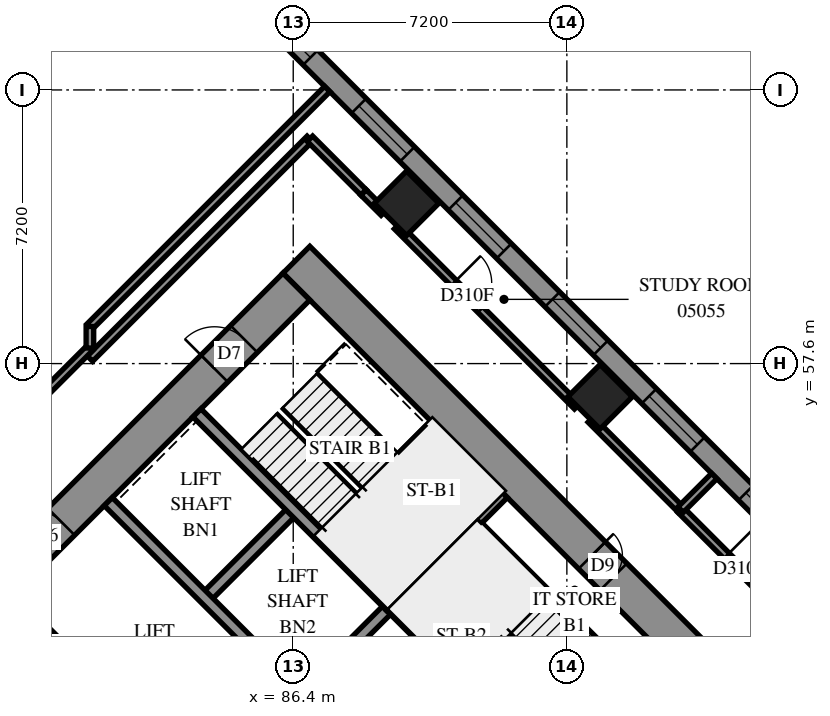
"""IFC4 building model, lengths in metres.
Left out: names, types, materials, properties, quantities, classifications, styles, units other than length and angle.
Written with IfcOpenShell. Run it as: python <this file> out.ifc"""

import sys

from ifc_helpers import new_model, si_unit, direction, frame, frame_2d, origin, origin_2d, place, context, subcontext, project, spatial, polyline, rectangle, outline, extrude, element, fill, save


model = new_model("IFC4")
c1 = context("Model", 3, precision=1e-05, world=origin(), true_north=direction((0.0, 1.0)))
c2 = subcontext(c1, "Body", "Model", "MODEL_VIEW")
j1 = project(units=[si_unit("LENGTHUNIT", "METRE"), si_unit("PLANEANGLEUNIT", "RADIAN")], contexts=[c1])
p1 = place(None, origin())
s1 = spatial("IfcSite", under=j1, at=p1, CompositionType="ELEMENT")
p2 = place(p1, origin())
s2 = spatial("IfcBuilding", under=s1, at=p2, CompositionType="ELEMENT")
p3 = place(p2, frame((0.0, 0.0, 22.8)))
s3 = spatial("IfcBuildingStorey", under=s2, at=p3, CompositionType="ELEMENT", Elevation=22.8)
for number, where, z_axis, x_axis in (
    (1, (89.382, 61.818, 0.0), (0.0, 0.0, 1.0), (0.707, -0.707, 0.0)),
    (2, (94.474, 56.727, 0.0), (0.0, 0.0, 1.0), (0.707, -0.707, 0.0)),
):
    element("IfcColumn", number, at=place(p3, frame(where, z_axis=z_axis, x_axis=x_axis)), inside=s3, PredefinedType="COLUMN", context=c2, shape_type="SweptSolid", body=[
        extrude(rectangle(XDim=1.2, YDim=1.2, at=origin_2d()), origin(), (0.0, 0.0, 1.0), 3.9),
    ])
p4 = place(p3, frame((86.483, 60.333, -0.4), z_axis=(0.0, 0.0, 1.0), x_axis=(0.70710983, -0.7071037324, 0.0)))
e3 = element("IfcWall", 3, at=p4, inside=s3, PredefinedType="SHEAR", context=c2, shape_type="SweptSolid", body=[
    extrude(rectangle(XDim=16.4, YDim=1.0, at=frame_2d((8.2, 0.0))), origin(), (0.0, 0.0, 1.0), 3.6),
])
p5 = place(p4, frame((11.0, 0.0, 0.4)))
e4 = element("IfcOpeningElement", 4, at=p5, cuts=e3, PredefinedType="OPENING", context=c2, shape_type="SweptSolid", body=[
    extrude(rectangle(XDim=0.8, YDim=2.1, at=frame_2d((0.4, 1.05))), frame((0.0, 0.51, 0.0), z_axis=(0.0, -1.0, 0.0), x_axis=(1.0, 0.0, 0.0)), (0.0, 0.0, 1.0), 1.02),
])
p6 = place(p3, frame((76.301, 49.443, -0.4), z_axis=(0.0, 0.0, 1.0), x_axis=(0.7071067812, 0.7071067812, 0.0)))
e5 = element("IfcWall", 5, at=p6, inside=s3, PredefinedType="SHEAR", context=c2, shape_type="SweptSolid", body=[
    extrude(rectangle(XDim=14.4, YDim=1.0, at=frame_2d((7.2, 0.0))), origin(), (0.0, 0.0, 1.0), 3.6),
])
p7 = place(p6, frame((4.55, 0.0, 0.4)))
e6 = element("IfcOpeningElement", 6, at=p7, cuts=e5, PredefinedType="OPENING", context=c2, shape_type="SweptSolid", body=[
    extrude(rectangle(XDim=1.1, YDim=2.1, at=frame_2d((0.55, 1.05))), frame((0.0, 0.51, 0.0), z_axis=(0.0, -1.0, 0.0), x_axis=(1.0, 0.0, 0.0)), (0.0, 0.0, 1.0), 1.02),
])
p8 = place(p6, frame((11.35, 0.0, 0.4)))
e7 = element("IfcOpeningElement", 7, at=p8, cuts=e5, PredefinedType="OPENING", context=c2, shape_type="SweptSolid", body=[
    extrude(rectangle(XDim=1.1, YDim=2.1, at=frame_2d((0.55, 1.05))), frame((0.0, 0.51, 0.0), z_axis=(0.0, -1.0, 0.0), x_axis=(1.0, 0.0, 0.0)), (0.0, 0.0, 1.0), 1.02),
])
p9 = place(p3, frame((84.079, 51.423, 0.0), z_axis=(0.0, 0.0, 1.0), x_axis=(0.7071219326, 0.7070916295, 0.0)))
e8 = element("IfcWall", 8, at=p9, inside=s3, PredefinedType="SOLIDWALL", context=c2, shape_type="SweptSolid", body=[
    extrude(rectangle(XDim=3.3, YDim=0.3, at=frame_2d((1.65, 0.0))), origin(), (0.0, 0.0, 1.0), 3.9),
])
p10 = place(p3, frame((86.625, 48.878, 0.0), z_axis=(0.0, 0.0, 1.0), x_axis=(0.7071067812, 0.7071067812, 0.0)))
e9 = element("IfcWall", 9, at=p10, inside=s3, PredefinedType="SOLIDWALL", context=c2, shape_type="SweptSolid", body=[
    extrude(rectangle(XDim=3.3, YDim=0.3, at=frame_2d((1.65, 0.0))), origin(), (0.0, 0.0, 1.0), 3.9),
])
p11 = place(p3, frame((78.988, 51.423, 0.0), z_axis=(0.0, 0.0, 1.0), x_axis=(0.7071067812, -0.7071067812, 0.0)))
e10 = element("IfcWall", 10, at=p11, inside=s3, PredefinedType="SOLIDWALL", context=c2, shape_type="SweptSolid", body=[
    extrude(rectangle(XDim=14.4, YDim=0.3, at=frame_2d((7.2, 0.0))), origin(), (0.0, 0.0, 1.0), 3.9),
])
p12 = place(p11, frame((1.25, 0.0, 0.0)))
e11 = element("IfcOpeningElement", 11, at=p12, cuts=e10, PredefinedType="OPENING", context=c2, shape_type="SweptSolid", body=[
    extrude(rectangle(XDim=1.1, YDim=2.1, at=frame_2d((0.55, 1.05))), frame((0.0, 0.16, 0.0), z_axis=(0.0, -1.0, 0.0), x_axis=(1.0, 0.0, 0.0)), (0.0, 0.0, 1.0), 0.32),
])
p13 = place(p11, frame((4.85, 0.0, 0.0)))
e12 = element("IfcOpeningElement", 12, at=p13, cuts=e10, PredefinedType="OPENING", context=c2, shape_type="SweptSolid", body=[
    extrude(rectangle(XDim=1.1, YDim=2.1, at=frame_2d((0.55, 1.05))), frame((0.0, 0.16, 0.0), z_axis=(0.0, -1.0, 0.0), x_axis=(1.0, 0.0, 0.0)), (0.0, 0.0, 1.0), 0.32),
])
p14 = place(p11, frame((8.45, 0.0, 0.0)))
e13 = element("IfcOpeningElement", 13, at=p14, cuts=e10, PredefinedType="OPENING", context=c2, shape_type="SweptSolid", body=[
    extrude(rectangle(XDim=1.1, YDim=2.1, at=frame_2d((0.55, 1.05))), frame((0.0, 0.16, 0.0), z_axis=(0.0, -1.0, 0.0), x_axis=(1.0, 0.0, 0.0)), (0.0, 0.0, 1.0), 0.32),
])
p15 = place(p11, frame((12.05, 0.0, 0.0)))
e14 = element("IfcOpeningElement", 14, at=p15, cuts=e10, PredefinedType="OPENING", context=c2, shape_type="SweptSolid", body=[
    extrude(rectangle(XDim=1.1, YDim=2.1, at=frame_2d((0.55, 1.05))), frame((0.0, 0.16, 0.0), z_axis=(0.0, -1.0, 0.0), x_axis=(1.0, 0.0, 0.0)), (0.0, 0.0, 1.0), 0.32),
])
p16 = place(p3, frame((81.534, 53.969, 0.0), z_axis=(0.0, 0.0, 1.0), x_axis=(0.707103309, -0.7071102534, 0.0)))
e15 = element("IfcWall", 15, at=p16, inside=s3, PredefinedType="SOLIDWALL", context=c2, shape_type="SweptSolid", body=[
    extrude(rectangle(XDim=14.4, YDim=0.3, at=frame_2d((7.2, 0.0))), origin(), (0.0, 0.0, 1.0), 3.9),
])
p17 = place(p16, frame((12.05, 0.0, 0.0)))
e16 = element("IfcOpeningElement", 16, at=p17, cuts=e15, PredefinedType="OPENING", context=c2, shape_type="SweptSolid", body=[
    extrude(rectangle(XDim=1.1, YDim=2.1, at=frame_2d((0.55, 1.05))), frame((0.0, 0.16, 0.0), z_axis=(0.0, -1.0, 0.0), x_axis=(1.0, 0.0, 0.0)), (0.0, 0.0, 1.0), 0.32),
])
for number, where, z_axis, x_axis in (
    (17, (83.867, 56.302, 0.0), (0.0, 0.0, 1.0), (0.707, -0.707, 0.0)),
    (18, (88.958, 51.211, 0.0), (0.0, 0.0, 1.0), (0.707, -0.707, 0.0)),
):
    element("IfcWall", number, at=place(p3, frame(where, z_axis=z_axis, x_axis=x_axis)), inside=s3, PredefinedType="SOLIDWALL", context=c2, shape_type="SweptSolid", body=[
        extrude(rectangle(XDim=7.2, YDim=0.3, at=frame_2d((3.6, 0.0))), origin(), (0.0, 0.0, 1.0), 3.9),
    ])
p18 = place(p3, frame((88.958, 51.211, 0.0), z_axis=(0.0, 0.0, 1.0), x_axis=(0.7071067812, 0.7071067812, 0.0)))
e19 = element("IfcWall", 19, at=p18, inside=s3, PredefinedType="SOLIDWALL", context=c2, shape_type="SweptSolid", body=[
    extrude(rectangle(XDim=4.2, YDim=0.3, at=frame_2d((2.1, 0.0))), origin(), (0.0, 0.0, 1.0), 3.9),
])
p19 = place(p3, frame((117.843, 34.665, 0.0), z_axis=(0.0, 0.0, 1.0), x_axis=(-0.7071067812, 0.7071067812, 0.0)))
e20 = element("IfcWall", 20, at=p19, inside=s3, PredefinedType="SOLIDWALL", context=c2, shape_type="SweptSolid", body=[
    extrude(outline(polyline([(-0.275, -0.275), (54.222, -0.275), (53.994, 0.275), (0.275, 0.275), (-0.275, -0.275)])), origin(), (0.0, 0.0, 1.0), 3.9),
])
p20 = place(p19, frame((0.8, 0.0, 0.7)))
e21 = element("IfcOpeningElement", 21, at=p20, cuts=e20, PredefinedType="OPENING", context=c2, shape_type="SweptSolid", body=[
    extrude(rectangle(XDim=1.8, YDim=2.4, at=frame_2d((0.9, 1.2))), frame((0.0, 0.285, 0.0), z_axis=(0.0, -1.0, 0.0), x_axis=(1.0, 0.0, 0.0)), (0.0, 0.0, 1.0), 0.57),
])
p21 = place(p19, frame((4.225, 0.0, 0.7)))
e22 = element("IfcOpeningElement", 22, at=p21, cuts=e20, PredefinedType="OPENING", context=c2, shape_type="SweptSolid", body=[
    extrude(rectangle(XDim=1.8, YDim=2.4, at=frame_2d((0.9, 1.2))), frame((0.0, 0.285, 0.0), z_axis=(0.0, -1.0, 0.0), x_axis=(1.0, 0.0, 0.0)), (0.0, 0.0, 1.0), 0.57),
])
p22 = place(p19, frame((7.825, 0.0, 0.7)))
e23 = element("IfcOpeningElement", 23, at=p22, cuts=e20, PredefinedType="OPENING", context=c2, shape_type="SweptSolid", body=[
    extrude(rectangle(XDim=1.8, YDim=2.4, at=frame_2d((0.9, 1.2))), frame((0.0, 0.285, 0.0), z_axis=(0.0, -1.0, 0.0), x_axis=(1.0, 0.0, 0.0)), (0.0, 0.0, 1.0), 0.57),
])
p23 = place(p19, frame((11.425, 0.0, 0.7)))
e24 = element("IfcOpeningElement", 24, at=p23, cuts=e20, PredefinedType="OPENING", context=c2, shape_type="SweptSolid", body=[
    extrude(rectangle(XDim=1.8, YDim=2.4, at=frame_2d((0.9, 1.2))), frame((0.0, 0.285, 0.0), z_axis=(0.0, -1.0, 0.0), x_axis=(1.0, 0.0, 0.0)), (0.0, 0.0, 1.0), 0.57),
])
p24 = place(p19, frame((15.025, 0.0, 0.7)))
e25 = element("IfcOpeningElement", 25, at=p24, cuts=e20, PredefinedType="OPENING", context=c2, shape_type="SweptSolid", body=[
    extrude(rectangle(XDim=1.8, YDim=2.4, at=frame_2d((0.9, 1.2))), frame((0.0, 0.285, 0.0), z_axis=(0.0, -1.0, 0.0), x_axis=(1.0, 0.0, 0.0)), (0.0, 0.0, 1.0), 0.57),
])
p25 = place(p19, frame((18.625, 0.0, 0.7)))
e26 = element("IfcOpeningElement", 26, at=p25, cuts=e20, PredefinedType="OPENING", context=c2, shape_type="SweptSolid", body=[
    extrude(rectangle(XDim=1.8, YDim=2.4, at=frame_2d((0.9, 1.2))), frame((0.0, 0.285, 0.0), z_axis=(0.0, -1.0, 0.0), x_axis=(1.0, 0.0, 0.0)), (0.0, 0.0, 1.0), 0.57),
])
p26 = place(p19, frame((22.225, 0.0, 0.7)))
e27 = element("IfcOpeningElement", 27, at=p26, cuts=e20, PredefinedType="OPENING", context=c2, shape_type="SweptSolid", body=[
    extrude(rectangle(XDim=1.8, YDim=2.4, at=frame_2d((0.9, 1.2))), frame((0.0, 0.285, 0.0), z_axis=(0.0, -1.0, 0.0), x_axis=(1.0, 0.0, 0.0)), (0.0, 0.0, 1.0), 0.57),
])
p27 = place(p19, frame((25.825, 0.0, 0.7)))
e28 = element("IfcOpeningElement", 28, at=p27, cuts=e20, PredefinedType="OPENING", context=c2, shape_type="SweptSolid", body=[
    extrude(rectangle(XDim=1.8, YDim=2.4, at=frame_2d((0.9, 1.2))), frame((0.0, 0.285, 0.0), z_axis=(0.0, -1.0, 0.0), x_axis=(1.0, 0.0, 0.0)), (0.0, 0.0, 1.0), 0.57),
])
p28 = place(p19, frame((29.425, 0.0, 0.7)))
e29 = element("IfcOpeningElement", 29, at=p28, cuts=e20, PredefinedType="OPENING", context=c2, shape_type="SweptSolid", body=[
    extrude(rectangle(XDim=1.8, YDim=2.4, at=frame_2d((0.9, 1.2))), frame((0.0, 0.285, 0.0), z_axis=(0.0, -1.0, 0.0), x_axis=(1.0, 0.0, 0.0)), (0.0, 0.0, 1.0), 0.57),
])
p29 = place(p19, frame((33.025, 0.0, 0.7)))
e30 = element("IfcOpeningElement", 30, at=p29, cuts=e20, PredefinedType="OPENING", context=c2, shape_type="SweptSolid", body=[
    extrude(rectangle(XDim=1.8, YDim=2.4, at=frame_2d((0.9, 1.2))), frame((0.0, 0.285, 0.0), z_axis=(0.0, -1.0, 0.0), x_axis=(1.0, 0.0, 0.0)), (0.0, 0.0, 1.0), 0.57),
])
p30 = place(p19, frame((36.625, 0.0, 0.7)))
e31 = element("IfcOpeningElement", 31, at=p30, cuts=e20, PredefinedType="OPENING", context=c2, shape_type="SweptSolid", body=[
    extrude(rectangle(XDim=1.8, YDim=2.4, at=frame_2d((0.9, 1.2))), frame((0.0, 0.285, 0.0), z_axis=(0.0, -1.0, 0.0), x_axis=(1.0, 0.0, 0.0)), (0.0, 0.0, 1.0), 0.57),
])
p31 = place(p19, frame((40.225, 0.0, 0.7)))
e32 = element("IfcOpeningElement", 32, at=p31, cuts=e20, PredefinedType="OPENING", context=c2, shape_type="SweptSolid", body=[
    extrude(rectangle(XDim=1.8, YDim=2.4, at=frame_2d((0.9, 1.2))), frame((0.0, 0.285, 0.0), z_axis=(0.0, -1.0, 0.0), x_axis=(1.0, 0.0, 0.0)), (0.0, 0.0, 1.0), 0.57),
])
p32 = place(p19, frame((43.825, 0.0, 0.7)))
e33 = element("IfcOpeningElement", 33, at=p32, cuts=e20, PredefinedType="OPENING", context=c2, shape_type="SweptSolid", body=[
    extrude(rectangle(XDim=1.8, YDim=2.4, at=frame_2d((0.9, 1.2))), frame((0.0, 0.285, 0.0), z_axis=(0.0, -1.0, 0.0), x_axis=(1.0, 0.0, 0.0)), (0.0, 0.0, 1.0), 0.57),
])
p33 = place(p19, frame((47.425, 0.0, 0.7)))
e34 = element("IfcOpeningElement", 34, at=p33, cuts=e20, PredefinedType="OPENING", context=c2, shape_type="SweptSolid", body=[
    extrude(rectangle(XDim=1.8, YDim=2.4, at=frame_2d((0.9, 1.2))), frame((0.0, 0.285, 0.0), z_axis=(0.0, -1.0, 0.0), x_axis=(1.0, 0.0, 0.0)), (0.0, 0.0, 1.0), 0.57),
])
p34 = place(p19, frame((51.06, 0.0, 0.7)))
e35 = element("IfcOpeningElement", 35, at=p34, cuts=e20, PredefinedType="OPENING", context=c2, shape_type="SweptSolid", body=[
    extrude(rectangle(XDim=1.8, YDim=2.4, at=frame_2d((0.9, 1.2))), frame((0.0, 0.285, 0.0), z_axis=(0.0, -1.0, 0.0), x_axis=(1.0, 0.0, 0.0)), (0.0, 0.0, 1.0), 0.57),
])
p35 = place(p3, frame((91.313, 53.354, 0.0), z_axis=(0.0, 0.0, 1.0), x_axis=(0.7071067812, -0.7071067812, 0.0)))
e36 = element("IfcWall", 36, at=p35, inside=s3, PredefinedType="PARTITIONING", context=c2, shape_type="SweptSolid", body=[
    extrude(rectangle(XDim=5.95, YDim=0.15, at=frame_2d((2.975, 0.0))), origin(), (0.0, 0.0, 1.0), 3.9),
])
p36 = place(p3, frame((81.049, 58.577, 0.0), z_axis=(0.0, 0.0, 1.0), x_axis=(0.7071124411, 0.7071011213, 0.0)))
e37 = element("IfcWall", 37, at=p36, inside=s3, PredefinedType="PARTITIONING", context=c2, shape_type="SweptSolid", body=[
    extrude(rectangle(XDim=8.834, YDim=0.2, at=frame_2d((4.417, 0.0))), origin(), (0.0, 0.0, 1.0), 3.9),
])
p37 = place(p3, frame((81.051, 57.731, 0.0), z_axis=(0.0, 0.0, 1.0), x_axis=(0.7071067812, 0.7071067812, 0.0)))
e38 = element("IfcWall", 38, at=p37, inside=s3, PredefinedType="PARTITIONING", context=c2, shape_type="SweptSolid", body=[
    extrude(rectangle(XDim=8.18, YDim=0.2, at=frame_2d((4.09, 0.0))), origin(), (0.0, 0.0, 1.0), 3.9),
])
p38 = place(p3, frame((89.13, 61.215, 0.0), z_axis=(0.0, 0.0, 1.0), x_axis=(0.7071067812, -0.7071067812, 0.0)))
e39 = element("IfcWall", 39, at=p38, inside=s3, PredefinedType="PARTITIONING", context=c2, shape_type="SweptSolid", body=[
    extrude(rectangle(XDim=6.703, YDim=0.2, at=frame_2d((3.352, 0.0))), origin(), (0.0, 0.0, 1.0), 3.9),
])
p39 = place(p38, frame((2.11, 0.0, 0.0)))
e40 = element("IfcOpeningElement", 40, at=p39, cuts=e39, PredefinedType="OPENING", context=c2, shape_type="SweptSolid", body=[
    extrude(rectangle(XDim=1.0, YDim=2.1, at=frame_2d((0.5, 1.05))), frame((0.0, 0.11, 0.0), z_axis=(0.0, -1.0, 0.0), x_axis=(1.0, 0.0, 0.0)), (0.0, 0.0, 1.0), 0.22),
])
p40 = place(p3, frame((94.229, 56.129, 0.0), z_axis=(0.0, 0.0, 1.0), x_axis=(0.706808235, -0.7074052014, 0.0)))
e41 = element("IfcWall", 41, at=p40, inside=s3, PredefinedType="PARTITIONING", context=c2, shape_type="SweptSolid", body=[
    extrude(rectangle(XDim=3.35, YDim=0.2, at=frame_2d((1.675, 0.0))), origin(), (0.0, 0.0, 1.0), 3.9),
])
p41 = place(p3, frame((96.591, 53.754, 0.0), z_axis=(0.0, 0.0, 1.0), x_axis=(0.7071067812, -0.7071067812, 0.0)))
e42 = element("IfcWall", 42, at=p41, inside=s3, PredefinedType="PARTITIONING", context=c2, shape_type="SweptSolid", body=[
    extrude(rectangle(XDim=3.318, YDim=0.2, at=frame_2d((1.659, 0.0))), origin(), (0.0, 0.0, 1.0), 3.9),
])
p42 = place(p41, frame((1.71, 0.0, 0.0)))
e43 = element("IfcOpeningElement", 43, at=p42, cuts=e42, PredefinedType="OPENING", context=c2, shape_type="SweptSolid", body=[
    extrude(rectangle(XDim=1.0, YDim=2.1, at=frame_2d((0.5, 1.05))), frame((0.0, 0.11, 0.0), z_axis=(0.0, -1.0, 0.0), x_axis=(1.0, 0.0, 0.0)), (0.0, 0.0, 1.0), 0.22),
])
p43 = place(p3, frame((86.84, 63.516, 0.0), z_axis=(0.0, 0.0, 1.0), x_axis=(0.7066061748, -0.7076070334, 0.0)))
e44 = element("IfcWall", 44, at=p43, inside=s3, PredefinedType="PARTITIONING", context=c2, shape_type="SweptSolid", body=[
    extrude(rectangle(XDim=1.998, YDim=0.2, at=frame_2d((0.999, 0.0))), origin(), (0.0, 0.0, 1.0), 3.9),
])
p44 = place(p3, frame((79.801, 56.763, 0.0), z_axis=(0.0, 0.0, 1.0), x_axis=(0.7071067812, 0.7071067812, 0.0)))
e45 = element("IfcWall", 45, at=p44, inside=s3, PredefinedType="PARTITIONING", context=c2, shape_type="SweptSolid", body=[
    extrude(rectangle(XDim=1.765, YDim=0.2, at=frame_2d((0.882, 0.0))), origin(), (0.0, 0.0, 1.0), 3.9),
])
p45 = place(p3, frame((96.593, 53.757, 0.0), z_axis=(0.0, 0.0, 1.0), x_axis=(0.7070668147, 0.7071467454, 0.0)))
e46 = element("IfcWall", 46, at=p45, inside=s3, PredefinedType="PARTITIONING", context=c2, shape_type="SweptSolid", body=[
    extrude(rectangle(XDim=1.251, YDim=0.2, at=frame_2d((0.626, 0.0))), origin(), (0.0, 0.0, 1.0), 3.9),
])
p46 = place(p3, frame((88.251, 62.101, 0.0), z_axis=(0.0, 0.0, 1.0), x_axis=(0.7084371761, -0.7057738785, 0.0)))
e47 = element("IfcWall", 47, at=p46, inside=s3, PredefinedType="PARTITIONING", context=c2, shape_type="SweptSolid", body=[
    extrude(rectangle(XDim=0.751, YDim=0.2, at=frame_2d((0.376, 0.0))), origin(), (0.0, 0.0, 1.0), 3.9),
])
p47 = place(p3, frame((81.05, 58.01, 0.0), z_axis=(0.0, 0.0, 1.0), x_axis=(0.0, 1.0, 0.0)))
e48 = element("IfcWall", 48, at=p47, inside=s3, PredefinedType="PARTITIONING", context=c2, shape_type="SweptSolid", body=[
    extrude(rectangle(XDim=0.566, YDim=0.2, at=frame_2d((0.283, 0.0))), origin(), (0.0, 0.0, 1.0), 3.9),
])
p48 = place(p27, origin())
e49 = element("IfcWindow", 49, at=p48, inside=s3, PartitioningType="SINGLE_PANEL", PredefinedType="WINDOW", context=c2, shape_type="SweptSolid", body=[
    extrude(rectangle(XDim=1.8, YDim=2.4, at=frame_2d((0.9, 1.2))), frame((0.0, 0.155, 0.0), z_axis=(0.0, -1.0, 0.0), x_axis=(1.0, 0.0, 0.0)), (0.0, 0.0, 1.0), 0.06),
])
fill(e28, e49)
p49 = place(p28, origin())
e50 = element("IfcWindow", 50, at=p49, inside=s3, PartitioningType="SINGLE_PANEL", PredefinedType="WINDOW", context=c2, shape_type="SweptSolid", body=[
    extrude(rectangle(XDim=1.8, YDim=2.4, at=frame_2d((0.9, 1.2))), frame((0.0, 0.155, 0.0), z_axis=(0.0, -1.0, 0.0), x_axis=(1.0, 0.0, 0.0)), (0.0, 0.0, 1.0), 0.06),
])
fill(e29, e50)
p50 = place(p29, origin())
e51 = element("IfcWindow", 51, at=p50, inside=s3, PartitioningType="SINGLE_PANEL", PredefinedType="WINDOW", context=c2, shape_type="SweptSolid", body=[
    extrude(rectangle(XDim=1.8, YDim=2.4, at=frame_2d((0.9, 1.2))), frame((0.0, 0.155, 0.0), z_axis=(0.0, -1.0, 0.0), x_axis=(1.0, 0.0, 0.0)), (0.0, 0.0, 1.0), 0.06),
])
fill(e30, e51)
p51 = place(p30, origin())
e52 = element("IfcWindow", 52, at=p51, inside=s3, PartitioningType="SINGLE_PANEL", PredefinedType="WINDOW", context=c2, shape_type="SweptSolid", body=[
    extrude(rectangle(XDim=1.8, YDim=2.4, at=frame_2d((0.9, 1.2))), frame((0.0, 0.155, 0.0), z_axis=(0.0, -1.0, 0.0), x_axis=(1.0, 0.0, 0.0)), (0.0, 0.0, 1.0), 0.06),
])
fill(e31, e52)
p52 = place(p31, origin())
e53 = element("IfcWindow", 53, at=p52, inside=s3, PartitioningType="SINGLE_PANEL", PredefinedType="WINDOW", context=c2, shape_type="SweptSolid", body=[
    extrude(rectangle(XDim=1.8, YDim=2.4, at=frame_2d((0.9, 1.2))), frame((0.0, 0.155, 0.0), z_axis=(0.0, -1.0, 0.0), x_axis=(1.0, 0.0, 0.0)), (0.0, 0.0, 1.0), 0.06),
])
fill(e32, e53)
p53 = place(p32, origin())
e54 = element("IfcWindow", 54, at=p53, inside=s3, PartitioningType="SINGLE_PANEL", PredefinedType="WINDOW", context=c2, shape_type="SweptSolid", body=[
    extrude(rectangle(XDim=1.8, YDim=2.4, at=frame_2d((0.9, 1.2))), frame((0.0, 0.155, 0.0), z_axis=(0.0, -1.0, 0.0), x_axis=(1.0, 0.0, 0.0)), (0.0, 0.0, 1.0), 0.06),
])
fill(e33, e54)
p54 = place(p5, origin())
e55 = element("IfcDoor", 55, at=p54, inside=s3, OperationType="SINGLE_SWING_RIGHT", PredefinedType="DOOR", context=c2, shape_type="SweptSolid", body=[
    extrude(rectangle(XDim=0.8, YDim=2.1, at=frame_2d((0.4, 1.05))), frame((0.0, -0.44, 0.0), z_axis=(0.0, -1.0, 0.0), x_axis=(1.0, 0.0, 0.0)), (0.0, 0.0, 1.0), 0.05),
])
fill(e4, e55)
p55 = place(p7, origin())
e56 = element("IfcDoor", 56, at=p55, inside=s3, OperationType="DOUBLE_DOOR_SINGLE_SWING", PredefinedType="DOOR", context=c2, shape_type="SweptSolid", body=[
    extrude(rectangle(XDim=1.1, YDim=2.1, at=frame_2d((0.55, 1.05))), frame((0.0, 0.025, 0.0), z_axis=(0.0, -1.0, 0.0), x_axis=(1.0, 0.0, 0.0)), (0.0, 0.0, 1.0), 0.05),
])
fill(e6, e56)
p56 = place(p8, origin())
e57 = element("IfcDoor", 57, at=p56, inside=s3, OperationType="SINGLE_SWING_LEFT", PredefinedType="DOOR", context=c2, shape_type="SweptSolid", body=[
    extrude(rectangle(XDim=1.1, YDim=2.1, at=frame_2d((0.55, 1.05))), frame((0.0, 0.025, 0.0), z_axis=(0.0, -1.0, 0.0), x_axis=(1.0, 0.0, 0.0)), (0.0, 0.0, 1.0), 0.05),
])
fill(e7, e57)
p57 = place(p12, origin())
e58 = element("IfcDoor", 58, at=p57, inside=s3, OperationType="SLIDING_TO_LEFT", PredefinedType="DOOR", context=c2, shape_type="SweptSolid", body=[
    extrude(rectangle(XDim=1.1, YDim=2.1, at=frame_2d((0.55, 1.05))), frame((0.0, 0.025, 0.0), z_axis=(0.0, -1.0, 0.0), x_axis=(1.0, 0.0, 0.0)), (0.0, 0.0, 1.0), 0.05),
])
fill(e11, e58)
p58 = place(p39, origin())
e59 = element("IfcDoor", 59, at=p58, inside=s3, OperationType="SINGLE_SWING_RIGHT", PredefinedType="DOOR", context=c2, shape_type="SweptSolid", body=[
    extrude(rectangle(XDim=1.0, YDim=2.1, at=frame_2d((0.5, 1.05))), frame((0.0, 0.025, 0.0), z_axis=(0.0, -1.0, 0.0), x_axis=(1.0, 0.0, 0.0)), (0.0, 0.0, 1.0), 0.05),
])
fill(e40, e59)
p59 = place(p42, origin())
e60 = element("IfcDoor", 60, at=p59, inside=s3, OperationType="SINGLE_SWING_RIGHT", PredefinedType="DOOR", context=c2, shape_type="SweptSolid", body=[
    extrude(rectangle(XDim=1.0, YDim=2.1, at=frame_2d((0.5, 1.05))), frame((0.0, 0.025, 0.0), z_axis=(0.0, -1.0, 0.0), x_axis=(1.0, 0.0, 0.0)), (0.0, 0.0, 1.0), 0.05),
])
fill(e43, e60)
save(model, sys.argv[1])
